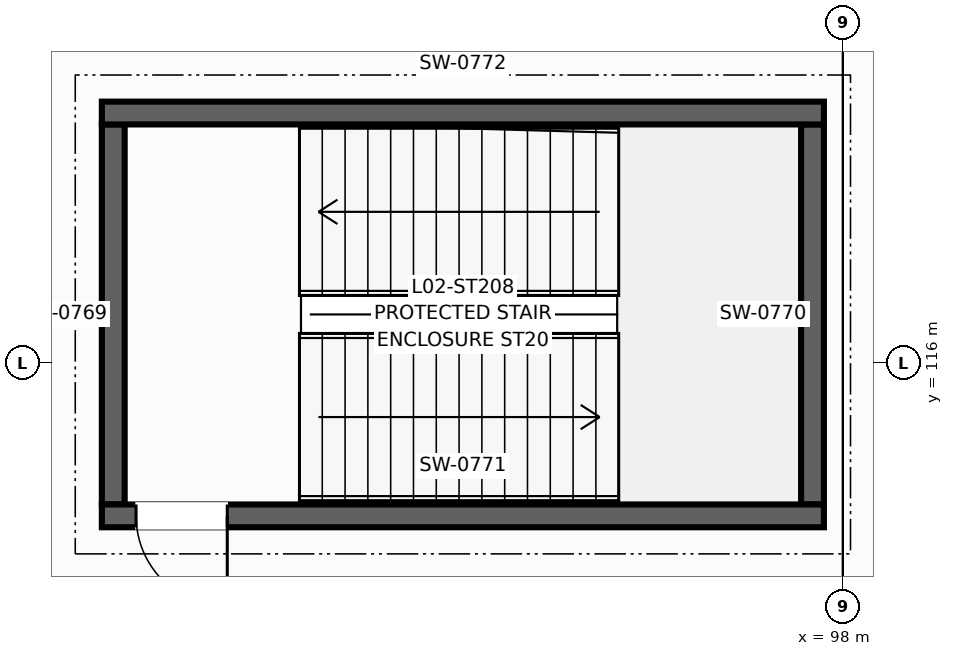
"""IFC4 building model, lengths in metres.
Left out: names, types, materials, properties, quantities, classifications, styles, units other than length and angle.
Written with IfcOpenShell. Run it as: python <this file> out.ifc"""

import sys

from ifc_helpers import new_model, si_unit, direction, frame, frame_2d, origin, place, context, subcontext, project, spatial, rectangle, extrude, element, fill, save


model = new_model("IFC4")
c1 = context("Model", 3, precision=1e-05, world=origin(), true_north=direction((0.0, 1.0)))
c2 = subcontext(c1, "Body", "Model", "MODEL_VIEW")
j1 = project(units=[si_unit("LENGTHUNIT", "METRE"), si_unit("PLANEANGLEUNIT", "RADIAN")], contexts=[c1])
p1 = place(None, origin())
s1 = spatial("IfcSite", under=j1, at=p1, CompositionType="ELEMENT")
p2 = place(p1, origin())
s2 = spatial("IfcBuilding", under=s1, at=p2, CompositionType="ELEMENT")
p3 = place(p2, frame((0.0, 0.0, 9.0)))
s3 = spatial("IfcBuildingStorey", under=s2, at=p3, CompositionType="ELEMENT", Elevation=9.0)
for number, where, z_axis, x_axis in (
    (1, (88.4, 114.14, 0.0), (0.0, 0.0, 1.0), (0.0, 1.0, 0.0)),
    (2, (97.6, 114.14, 0.0), (0.0, 0.0, 1.0), (0.0, 1.0, 0.0)),
):
    element("IfcWall", number, at=place(p3, frame(where, z_axis=z_axis, x_axis=x_axis)), inside=s3, PredefinedType="SHEAR", context=c2, shape_type="SweptSolid", body=[
        extrude(rectangle(XDim=5.0, YDim=0.3, at=frame_2d((2.5, 0.0))), origin(), (0.0, 0.0, 1.0), 4.25),
    ])
p4 = place(p3, frame((88.25, 113.99, 0.0), z_axis=(0.0, 0.0, 1.0), x_axis=(1.0, 0.0, 0.0)))
e3 = element("IfcWall", 3, at=p4, inside=s3, PredefinedType="SHEAR", context=c2, shape_type="SweptSolid", body=[
    extrude(rectangle(XDim=9.5, YDim=0.3, at=frame_2d((4.75, 0.0))), origin(), (0.0, 0.0, 1.0), 4.25),
])
p5 = place(p4, frame((0.45, 0.0, 0.0)))
e4 = element("IfcOpeningElement", 4, at=p5, cuts=e3, PredefinedType="OPENING", context=c2, shape_type="SweptSolid", body=[
    extrude(rectangle(XDim=1.2, YDim=2.2, at=frame_2d((0.6, 1.1))), frame((0.0, 0.16, 0.0), z_axis=(0.0, -1.0, 0.0), x_axis=(1.0, 0.0, 0.0)), (0.0, 0.0, 1.0), 0.32),
])
p6 = place(p3, frame((88.25, 119.29, 0.0), z_axis=(0.0, 0.0, 1.0), x_axis=(1.0, 0.0, 0.0)))
e5 = element("IfcWall", 5, at=p6, inside=s3, PredefinedType="SHEAR", context=c2, shape_type="SweptSolid", body=[
    extrude(rectangle(XDim=9.5, YDim=0.3, at=frame_2d((4.75, 0.0))), origin(), (0.0, 0.0, 1.0), 4.25),
])
p7 = place(p5, frame((1.2, 0.0, 0.0), z_axis=(0.0, 0.0, 1.0), x_axis=(-1.0, 0.0, 0.0)))
e6 = element("IfcDoor", 6, at=p7, inside=s3, OperationType="SINGLE_SWING_RIGHT", PredefinedType="DOOR", context=c2, shape_type="SweptSolid", body=[
    extrude(rectangle(XDim=1.2, YDim=2.2, at=frame_2d((0.6, 1.1))), frame((0.0, 0.025, 0.0), z_axis=(0.0, -1.0, 0.0), x_axis=(1.0, 0.0, 0.0)), (0.0, 0.0, 1.0), 0.05),
])
fill(e4, e6)
save(model, sys.argv[1])
